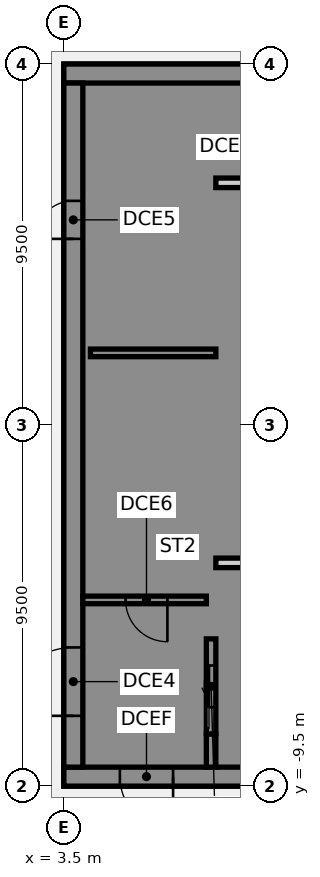
"""IFC4 building model, lengths in metres.
Left out: names, types, materials, properties, quantities, classifications, styles, units other than length and angle.
Written with IfcOpenShell. Run it as: python <this file> out.ifc"""

import sys

from ifc_helpers import new_model, si_unit, direction, frame, frame_2d, origin, place, context, subcontext, project, spatial, polyline, rectangle, outline, extrude, element, fill, save


model = new_model("IFC4")
c1 = context("Model", 3, precision=1e-05, world=origin(), true_north=direction((0.0, 1.0)))
c2 = subcontext(c1, "Body", "Model", "MODEL_VIEW")
j1 = project(units=[si_unit("LENGTHUNIT", "METRE"), si_unit("PLANEANGLEUNIT", "RADIAN")], contexts=[c1])
p1 = place(None, origin())
s1 = spatial("IfcSite", under=j1, at=p1, CompositionType="ELEMENT")
p2 = place(p1, origin())
s2 = spatial("IfcBuilding", under=s1, at=p2, CompositionType="ELEMENT")
p3 = place(p2, frame((0.0, 0.0, 309.4)))
s3 = spatial("IfcBuildingStorey", under=s2, at=p3, CompositionType="ELEMENT", Elevation=309.4)
p4 = place(p3, frame((16.5, -9.25, 0.0), z_axis=(0.0, 0.0, 1.0), x_axis=(-1.0, 0.0, 0.0)))
e1 = element("IfcWall", 1, at=p4, inside=s3, PredefinedType="SHEAR", context=c2, shape_type="SweptSolid", body=[
    extrude(rectangle(XDim=13.0, YDim=0.5, at=frame_2d((6.5, 0.0))), origin(), (0.0, 0.0, 1.0), 3.82),
])
p5 = place(p4, frame((4.15, 0.0, 0.0)))
e2 = element("IfcOpeningElement", 2, at=p5, cuts=e1, PredefinedType="OPENING", context=c2, shape_type="SweptSolid", body=[
    extrude(rectangle(XDim=1.4, YDim=2.1, at=frame_2d((0.7, 1.05))), frame((0.0, 0.26, 0.0), z_axis=(0.0, -1.0, 0.0), x_axis=(1.0, 0.0, 0.0)), (0.0, 0.0, 1.0), 0.52),
])
p6 = place(p4, frame((10.125, 0.0, 0.0)))
e3 = element("IfcOpeningElement", 3, at=p6, cuts=e1, PredefinedType="OPENING", context=c2, shape_type="SweptSolid", body=[
    extrude(rectangle(XDim=1.4, YDim=2.1, at=frame_2d((0.7, 1.05))), frame((0.0, 0.26, 0.0), z_axis=(0.0, -1.0, 0.0), x_axis=(1.0, 0.0, 0.0)), (0.0, 0.0, 1.0), 0.52),
])
p7 = place(p3, frame((16.5, 9.25, 0.0), z_axis=(0.0, 0.0, 1.0), x_axis=(-1.0, 0.0, 0.0)))
e4 = element("IfcWall", 4, at=p7, inside=s3, PredefinedType="SHEAR", context=c2, shape_type="SweptSolid", body=[
    extrude(rectangle(XDim=13.0, YDim=0.5, at=frame_2d((6.5, 0.0))), origin(), (0.0, 0.0, 1.0), 3.82),
])
p8 = place(p3, origin())
e5 = element("IfcWall", 5, at=p8, inside=s3, PredefinedType="SHEAR", context=c2, shape_type="SweptSolid", body=[
    extrude(outline(polyline([(9.8, -5.625), (9.8, -5.375), (7.5, -5.375), (7.5, 8.125), (9.8, 8.125), (9.8, 9.0), (7.5, 9.0), (7.25, 9.0), (7.25, -5.625), (7.5, -5.625), (9.8, -5.625)])), origin(), (0.0, 0.0, 1.0), 3.82),
])
p9 = place(p3, origin())
e6 = element("IfcWall", 6, at=p9, inside=s3, PredefinedType="SHEAR", context=c2, shape_type="SweptSolid", body=[
    extrude(outline(polyline([(7.5, -8.125), (7.5, -9.0), (9.8, -9.0), (9.8, -8.125), (9.8, -5.625), (9.55, -5.625), (9.55, -8.125), (7.5, -8.125)])), origin(), (0.0, 0.0, 1.0), 3.82),
])
p10 = place(p3, frame((7.375, -9.0, 0.0), z_axis=(0.0, 0.0, 1.0), x_axis=(0.0, 1.0, 0.0)))
e7 = element("IfcWall", 7, at=p10, inside=s3, PredefinedType="SHEAR", context=c2, shape_type="SweptSolid", body=[
    extrude(rectangle(XDim=0.875, YDim=0.25, at=frame_2d((0.438, 0.0))), origin(), (0.0, 0.0, 1.0), 3.82),
])
p11 = place(p3, frame((7.5, 1.9, 0.0), z_axis=(0.0, 0.0, 1.0), x_axis=(-1.0, 0.0, 0.0)))
e8 = element("IfcWall", 8, at=p11, inside=s3, PredefinedType="SHEAR", context=c2, shape_type="SweptSolid", body=[
    extrude(rectangle(XDim=3.3, YDim=0.2, at=frame_2d((1.65, 0.0))), origin(), (0.0, 0.0, 1.0), 3.82),
])
p12 = place(p3, frame((7.375, -8.125, 0.0), z_axis=(0.0, 0.0, 1.0), x_axis=(0.0, 1.0, 0.0)))
e9 = element("IfcWall", 9, at=p12, inside=s3, PredefinedType="SHEAR", context=c2, shape_type="SweptSolid", body=[
    extrude(rectangle(XDim=2.5, YDim=0.25, at=frame_2d((1.25, 0.0))), origin(), (0.0, 0.0, 1.0), 3.82),
])
p13 = place(p12, frame((0.7, 0.0, 0.0)))
e10 = element("IfcOpeningElement", 10, at=p13, cuts=e9, PredefinedType="OPENING", context=c2, shape_type="SweptSolid", body=[
    extrude(rectangle(XDim=1.1, YDim=2.1, at=frame_2d((0.55, 1.05))), frame((0.0, 0.135, 0.0), z_axis=(0.0, -1.0, 0.0), x_axis=(1.0, 0.0, 0.0)), (0.0, 0.0, 1.0), 0.27),
])
p14 = place(p3, frame((3.75, -9.0, 0.0), z_axis=(0.0, 0.0, 1.0), x_axis=(0.0, 1.0, 0.0)))
e11 = element("IfcWall", 11, at=p14, inside=s3, PredefinedType="SHEAR", context=c2, shape_type="SweptSolid", body=[
    extrude(rectangle(XDim=18.0, YDim=0.5, at=frame_2d((9.0, 0.0))), origin(), (0.0, 0.0, 1.0), 3.82),
])
p15 = place(p14, frame((1.35, 0.0, 0.0)))
e12 = element("IfcOpeningElement", 12, at=p15, cuts=e11, PredefinedType="OPENING", context=c2, shape_type="SweptSolid", body=[
    extrude(rectangle(XDim=1.8, YDim=2.1, at=frame_2d((0.9, 1.05))), frame((0.0, 0.26, 0.0), z_axis=(0.0, -1.0, 0.0), x_axis=(1.0, 0.0, 0.0)), (0.0, 0.0, 1.0), 0.52),
])
p16 = place(p14, frame((13.9, 0.0, 0.0)))
e13 = element("IfcOpeningElement", 13, at=p16, cuts=e11, PredefinedType="OPENING", context=c2, shape_type="SweptSolid", body=[
    extrude(rectangle(XDim=1.0, YDim=2.1, at=frame_2d((0.5, 1.05))), frame((0.0, 0.26, 0.0), z_axis=(0.0, -1.0, 0.0), x_axis=(1.0, 0.0, 0.0)), (0.0, 0.0, 1.0), 0.52),
])
p17 = place(p3, frame((7.25, -4.6, 0.0), z_axis=(0.0, 0.0, 1.0), x_axis=(-1.0, 0.0, 0.0)))
e14 = element("IfcWall", 14, at=p17, inside=s3, PredefinedType="SHEAR", context=c2, shape_type="SweptSolid", body=[
    extrude(rectangle(XDim=3.25, YDim=0.2, at=frame_2d((1.625, 0.0))), origin(), (0.0, 0.0, 1.0), 3.82),
])
p18 = place(p17, frame((1.025, 0.0, 0.0)))
e15 = element("IfcOpeningElement", 15, at=p18, cuts=e14, PredefinedType="OPENING", context=c2, shape_type="SweptSolid", body=[
    extrude(rectangle(XDim=1.1, YDim=2.1, at=frame_2d((0.55, 1.05))), frame((0.0, 0.11, 0.0), z_axis=(0.0, -1.0, 0.0), x_axis=(1.0, 0.0, 0.0)), (0.0, 0.0, 1.0), 0.22),
])
for number, where, z_axis, x_axis in (
    (16, (9.8, -3.625, 0.0), (0.0, 0.0, 1.0), (-1.0, 0.0, 0.0)),
    (17, (9.8, 6.375, 0.0), (0.0, 0.0, 1.0), (-1.0, 0.0, 0.0)),
):
    element("IfcWall", number, at=place(p3, frame(where, z_axis=z_axis, x_axis=x_axis)), inside=s3, PredefinedType="PARTITIONING", context=c2, shape_type="SweptSolid", body=[
        extrude(rectangle(XDim=2.3, YDim=0.25, at=frame_2d((1.15, 0.0))), origin(), (0.0, 0.0, 1.0), 3.82),
    ])
p19 = place(p6, origin())
e18 = element("IfcDoor", 18, at=p19, inside=s3, OperationType="SINGLE_SWING_LEFT", PredefinedType="DOOR", context=c2, shape_type="SweptSolid", body=[
    extrude(rectangle(XDim=1.4, YDim=2.1, at=frame_2d((0.7, 1.05))), frame((0.0, 0.025, 0.0), z_axis=(0.0, -1.0, 0.0), x_axis=(1.0, 0.0, 0.0)), (0.0, 0.0, 1.0), 0.05),
])
fill(e3, e18)
p20 = place(p15, origin())
e19 = element("IfcDoor", 19, at=p20, inside=s3, OperationType="SINGLE_SWING_LEFT", PredefinedType="DOOR", context=c2, shape_type="SweptSolid", body=[
    extrude(rectangle(XDim=1.8, YDim=2.1, at=frame_2d((0.9, 1.05))), frame((0.0, 0.025, 0.0), z_axis=(0.0, -1.0, 0.0), x_axis=(1.0, 0.0, 0.0)), (0.0, 0.0, 1.0), 0.05),
])
fill(e12, e19)
p21 = place(p16, origin())
e20 = element("IfcDoor", 20, at=p21, inside=s3, OperationType="SINGLE_SWING_LEFT", PredefinedType="DOOR", context=c2, shape_type="SweptSolid", body=[
    extrude(rectangle(XDim=1.0, YDim=2.1, at=frame_2d((0.5, 1.05))), frame((0.0, 0.025, 0.0), z_axis=(0.0, -1.0, 0.0), x_axis=(1.0, 0.0, 0.0)), (0.0, 0.0, 1.0), 0.05),
])
fill(e13, e20)
p22 = place(p18, origin())
e21 = element("IfcDoor", 21, at=p22, inside=s3, OperationType="SINGLE_SWING_LEFT", PredefinedType="DOOR", context=c2, shape_type="SweptSolid", body=[
    extrude(rectangle(XDim=1.1, YDim=2.1, at=frame_2d((0.55, 1.05))), frame((0.0, 0.025, 0.0), z_axis=(0.0, -1.0, 0.0), x_axis=(1.0, 0.0, 0.0)), (0.0, 0.0, 1.0), 0.05),
])
fill(e15, e21)
p23 = place(p13, origin())
e22 = element("IfcDoor", 22, at=p23, inside=s3, OperationType="SLIDING_TO_LEFT", PredefinedType="DOOR", context=c2, shape_type="SweptSolid", body=[
    extrude(rectangle(XDim=1.1, YDim=2.1, at=frame_2d((0.55, 1.05))), frame((0.0, 0.025, 0.0), z_axis=(0.0, -1.0, 0.0), x_axis=(1.0, 0.0, 0.0)), (0.0, 0.0, 1.0), 0.05),
])
fill(e10, e22)
save(model, sys.argv[1])
